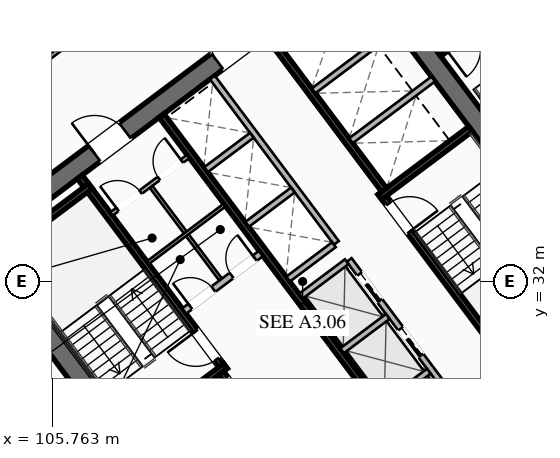
"""IFC4 building model, lengths in metres.
Left out: names, types, materials, properties, quantities, classifications, styles, units other than length and angle.
Written with IfcOpenShell. Run it as: python <this file> out.ifc"""

import sys

from ifc_helpers import new_model, si_unit, direction, frame, frame_2d, origin, place, context, subcontext, project, spatial, rectangle, extrude, element, fill, save


model = new_model("IFC4")
c1 = context("Model", 3, precision=1e-05, world=origin(), true_north=direction((0.0, 1.0)))
c2 = subcontext(c1, "Body", "Model", "MODEL_VIEW")
j1 = project(units=[si_unit("LENGTHUNIT", "METRE"), si_unit("PLANEANGLEUNIT", "RADIAN")], contexts=[c1])
p1 = place(None, origin())
s1 = spatial("IfcSite", under=j1, at=p1, CompositionType="ELEMENT")
p2 = place(p1, origin())
s2 = spatial("IfcBuilding", under=s1, at=p2, CompositionType="ELEMENT")
p3 = place(p2, frame((0.0, 0.0, 74.3)))
s3 = spatial("IfcBuildingStorey", under=s2, at=p3, CompositionType="ELEMENT", Elevation=74.3)
for number, where, z_axis, x_axis in (
    (1, (112.476, 21.107, 0.0), (0.0, 0.0, 1.0), (-0.6, 0.8, 0.0)),
    (2, (115.524, 42.893, 0.0), (0.0, 0.0, 1.0), (0.6, -0.8, 0.0)),
):
    element("IfcWall", number, at=place(p3, frame(where, z_axis=z_axis, x_axis=x_axis)), inside=s3, PredefinedType="SHEAR", context=c2, shape_type="SweptSolid", body=[
        extrude(rectangle(XDim=15.6, YDim=0.65, at=frame_2d((7.8, 0.0))), origin(), (0.0, 0.0, 1.0), 3.55),
    ])
p4 = place(p3, frame((124.429, 30.478, 0.0), z_axis=(0.0, 0.0, 1.0), x_axis=(-0.799998028465, -0.600002628705, 0.0)))
e3 = element("IfcWall", 3, at=p4, inside=s3, PredefinedType="SHEAR", context=c2, shape_type="SweptSolid", body=[
    extrude(rectangle(XDim=14.86, YDim=0.65, at=frame_2d((7.43, 0.0))), origin(), (0.0, 0.0, 1.0), 3.55),
])
p5 = place(p4, frame((9.13, 0.0, 0.0)))
e4 = element("IfcOpeningElement", 4, at=p5, cuts=e3, PredefinedType="OPENING", context=c2, shape_type="SweptSolid", body=[
    extrude(rectangle(XDim=1.25, YDim=2.25, at=frame_2d((0.625, 1.125))), frame((0.0, 0.335, 0.0), z_axis=(0.0, -1.0, 0.0), x_axis=(1.0, 0.0, 0.0)), (0.0, 0.0, 1.0), 0.67),
])
p6 = place(p4, frame((4.08, 0.0, 0.0)))
e5 = element("IfcOpeningElement", 5, at=p6, cuts=e3, PredefinedType="OPENING", context=c2, shape_type="SweptSolid", body=[
    extrude(rectangle(XDim=1.25, YDim=2.25, at=frame_2d((0.625, 1.125))), frame((0.0, 0.335, 0.0), z_axis=(0.0, -1.0, 0.0), x_axis=(1.0, 0.0, 0.0)), (0.0, 0.0, 1.0), 0.67),
])
p7 = place(p3, frame((103.571, 33.522, 0.0), z_axis=(0.0, 0.0, 1.0), x_axis=(0.799998028465, 0.600002628705, 0.0)))
e6 = element("IfcWall", 6, at=p7, inside=s3, PredefinedType="SHEAR", context=c2, shape_type="SweptSolid", body=[
    extrude(rectangle(XDim=14.86, YDim=0.65, at=frame_2d((7.43, 0.0))), origin(), (0.0, 0.0, 1.0), 3.55),
])
p8 = place(p7, frame((4.48, 0.0, 0.0)))
e7 = element("IfcOpeningElement", 7, at=p8, cuts=e6, PredefinedType="OPENING", context=c2, shape_type="SweptSolid", body=[
    extrude(rectangle(XDim=1.25, YDim=2.25, at=frame_2d((0.625, 1.125))), frame((0.0, 0.335, 0.0), z_axis=(0.0, -1.0, 0.0), x_axis=(1.0, 0.0, 0.0)), (0.0, 0.0, 1.0), 0.67),
])
p9 = place(p7, frame((9.53, 0.0, 0.0)))
e8 = element("IfcOpeningElement", 8, at=p9, cuts=e6, PredefinedType="OPENING", context=c2, shape_type="SweptSolid", body=[
    extrude(rectangle(XDim=1.25, YDim=2.25, at=frame_2d((0.625, 1.125))), frame((0.0, 0.335, 0.0), z_axis=(0.0, -1.0, 0.0), x_axis=(1.0, 0.0, 0.0)), (0.0, 0.0, 1.0), 0.67),
])
p10 = place(p3, frame((111.44, 29.08, 0.0), z_axis=(0.0, 0.0, 1.0), x_axis=(-0.600009827119, 0.799992629566, 0.0)))
e9 = element("IfcWall", 9, at=p10, inside=s3, PredefinedType="SHEAR", context=c2, shape_type="SweptSolid", body=[
    extrude(rectangle(XDim=7.95, YDim=0.2, at=frame_2d((3.975, 0.0))), origin(), (0.0, 0.0, 1.0), 3.35),
])
p11 = place(p10, frame((0.45, 0.0, 0.0)))
e10 = element("IfcOpeningElement", 10, at=p11, cuts=e9, PredefinedType="OPENING", context=c2, shape_type="SweptSolid", body=[
    extrude(rectangle(XDim=1.15, YDim=2.2, at=frame_2d((0.575, 1.1))), frame((0.0, 0.11, 0.0), z_axis=(0.0, -1.0, 0.0), x_axis=(1.0, 0.0, 0.0)), (0.0, 0.0, 1.0), 0.22),
])
for number, where, z_axis, x_axis in (
    (11, (108.476, 26.982, 0.0), (0.0, 0.0, 1.0), (0.8, 0.6, 0.0)),
    (12, (104.036, 32.902, 0.0), (0.0, 0.0, 1.0), (0.8, 0.6, 0.0)),
):
    element("IfcWall", number, at=place(p3, frame(where, z_axis=z_axis, x_axis=x_axis)), inside=s3, PredefinedType="SHEAR", context=c2, shape_type="SweptSolid", body=[
        extrude(rectangle(XDim=3.73, YDim=0.2, at=frame_2d((1.865, 0.0))), origin(), (0.0, 0.0, 1.0), 3.35),
    ])
p12 = place(p3, frame((116.56, 34.92, 0.0), z_axis=(0.0, 0.0, 1.0), x_axis=(0.600009827119, -0.799992629566, 0.0)))
e13 = element("IfcWall", 13, at=p12, inside=s3, PredefinedType="SHEAR", context=c2, shape_type="SweptSolid", body=[
    extrude(rectangle(XDim=7.95, YDim=0.2, at=frame_2d((3.975, 0.0))), origin(), (0.0, 0.0, 1.0), 3.35),
])
p13 = place(p12, frame((0.45, 0.0, 0.0)))
e14 = element("IfcOpeningElement", 14, at=p13, cuts=e13, PredefinedType="OPENING", context=c2, shape_type="SweptSolid", body=[
    extrude(rectangle(XDim=1.15, YDim=2.2, at=frame_2d((0.575, 1.1))), frame((0.0, 0.11, 0.0), z_axis=(0.0, -1.0, 0.0), x_axis=(1.0, 0.0, 0.0)), (0.0, 0.0, 1.0), 0.22),
])
p14 = place(p3, frame((116.54, 34.78, 0.0), z_axis=(0.0, 0.0, 1.0), x_axis=(0.799984290658, 0.600020945218, 0.0)))
e15 = element("IfcWall", 15, at=p14, inside=s3, PredefinedType="SHEAR", context=c2, shape_type="SweptSolid", body=[
    extrude(rectangle(XDim=3.73, YDim=0.2, at=frame_2d((1.865, 0.0))), origin(), (0.0, 0.0, 1.0), 3.35),
])
p15 = place(p3, frame((117.938, 26.016, 0.0), z_axis=(0.0, 0.0, 1.0), x_axis=(-0.600005463273, 0.799995902516, 0.0)))
e16 = element("IfcWall", 16, at=p15, inside=s3, PredefinedType="SHEAR", context=c2, shape_type="SweptSolid", body=[
    extrude(rectangle(XDim=14.3, YDim=0.2, at=frame_2d((7.15, 0.0))), origin(), (0.0, 0.0, 1.0), 3.35),
])
p16 = place(p3, frame((110.104, 31.028, 0.0), z_axis=(0.0, 0.0, 1.0), x_axis=(0.800018601094, 0.59997519774, 0.0)))
e17 = element("IfcWall", 17, at=p16, inside=s3, PredefinedType="SOLIDWALL", context=c2, shape_type="SweptSolid", body=[
    extrude(rectangle(XDim=3.15, YDim=0.22, at=frame_2d((1.575, 0.0))), origin(), (0.0, 0.0, 1.0), 2.703),
])
p17 = place(p16, frame((0.25, 0.0, 0.0)))
e18 = element("IfcOpeningElement", 18, at=p17, cuts=e17, PredefinedType="OPENING", context=c2, shape_type="SweptSolid", body=[
    extrude(rectangle(XDim=0.95, YDim=2.05, at=frame_2d((0.475, 1.025))), frame((0.0, 0.12, 0.0), z_axis=(0.0, -1.0, 0.0), x_axis=(1.0, 0.0, 0.0)), (0.0, 0.0, 1.0), 0.24),
])
p18 = place(p16, frame((1.95, 0.0, 0.0)))
e19 = element("IfcOpeningElement", 19, at=p18, cuts=e17, PredefinedType="OPENING", context=c2, shape_type="SweptSolid", body=[
    extrude(rectangle(XDim=0.95, YDim=2.05, at=frame_2d((0.475, 1.025))), frame((0.0, 0.12, 0.0), z_axis=(0.0, -1.0, 0.0), x_axis=(1.0, 0.0, 0.0)), (0.0, 0.0, 1.0), 0.24),
])
p19 = place(p3, frame((115.13, 23.91, 0.0), z_axis=(0.0, 0.0, 1.0), x_axis=(-0.599975393228, 0.800018454488, 0.0)))
e20 = element("IfcWall", 20, at=p19, inside=s3, PredefinedType="SHEAR", context=c2, shape_type="SweptSolid", body=[
    extrude(rectangle(XDim=6.35, YDim=0.2, at=frame_2d((3.175, 0.0))), origin(), (0.0, 0.0, 1.0), 3.35),
])
p20 = place(p19, frame((4.775, 0.0, 0.0)))
e21 = element("IfcOpeningElement", 21, at=p20, cuts=e20, PredefinedType="OPENING", context=c2, shape_type="SweptSolid", body=[
    extrude(rectangle(XDim=1.3, YDim=2.25, at=frame_2d((0.65, 1.125))), frame((0.0, 0.11, 0.0), z_axis=(0.0, -1.0, 0.0), x_axis=(1.0, 0.0, 0.0)), (0.0, 0.0, 1.0), 0.22),
])
p21 = place(p19, frame((2.775, 0.0, 0.0)))
e22 = element("IfcOpeningElement", 22, at=p21, cuts=e20, PredefinedType="OPENING", context=c2, shape_type="SweptSolid", body=[
    extrude(rectangle(XDim=1.3, YDim=2.25, at=frame_2d((0.65, 1.125))), frame((0.0, 0.11, 0.0), z_axis=(0.0, -1.0, 0.0), x_axis=(1.0, 0.0, 0.0)), (0.0, 0.0, 1.0), 0.22),
])
p22 = place(p19, frame((0.575, 0.0, 0.0)))
e23 = element("IfcOpeningElement", 23, at=p22, cuts=e20, PredefinedType="OPENING", context=c2, shape_type="SweptSolid", body=[
    extrude(rectangle(XDim=1.3, YDim=2.25, at=frame_2d((0.65, 1.125))), frame((0.0, 0.11, 0.0), z_axis=(0.0, -1.0, 0.0), x_axis=(1.0, 0.0, 0.0)), (0.0, 0.0, 1.0), 0.22),
])
p23 = place(p3, frame((112.87, 40.09, 0.0), z_axis=(0.0, 0.0, 1.0), x_axis=(0.599975393228, -0.800018454488, 0.0)))
e24 = element("IfcWall", 24, at=p23, inside=s3, PredefinedType="SHEAR", context=c2, shape_type="SweptSolid", body=[
    extrude(rectangle(XDim=6.35, YDim=0.2, at=frame_2d((3.175, 0.0))), origin(), (0.0, 0.0, 1.0), 3.35),
])
for number, where, z_axis, x_axis in (
    (25, (115.59, 36.63, 0.0), (0.0, 0.0, 1.0), (0.8, 0.6, 0.0)),
    (26, (114.36, 38.27, 0.0), (0.0, 0.0, 1.0), (0.8, 0.6, 0.0)),
):
    element("IfcWall", number, at=place(p3, frame(where, z_axis=z_axis, x_axis=x_axis)), inside=s3, PredefinedType="SOLIDWALL", context=c2, shape_type="SweptSolid", body=[
        extrude(rectangle(XDim=3.38, YDim=0.2, at=frame_2d((1.69, 0.0))), origin(), (0.0, 0.0, 1.0), 3.35),
    ])
p24 = place(p3, frame((107.71, 34.22, 0.0), z_axis=(0.0, 0.0, 1.0), x_axis=(0.799981399002, 0.60002480053, 0.0)))
e27 = element("IfcWall", 27, at=p24, inside=s3, PredefinedType="PARTITIONING", context=c2, shape_type="SweptSolid", body=[
    extrude(rectangle(XDim=3.15, YDim=0.135, at=frame_2d((1.575, 0.0))), origin(), (0.0, 0.0, 1.0), 2.703),
])
p25 = place(p24, frame((0.25, 0.0, 0.0)))
e28 = element("IfcOpeningElement", 28, at=p25, cuts=e27, PredefinedType="OPENING", context=c2, shape_type="SweptSolid", body=[
    extrude(rectangle(XDim=0.95, YDim=2.05, at=frame_2d((0.475, 1.025))), frame((0.0, 0.077, 0.0), z_axis=(0.0, -1.0, 0.0), x_axis=(1.0, 0.0, 0.0)), (0.0, 0.0, 1.0), 0.155),
])
p26 = place(p24, frame((1.95, 0.0, 0.0)))
e29 = element("IfcOpeningElement", 29, at=p26, cuts=e27, PredefinedType="OPENING", context=c2, shape_type="SweptSolid", body=[
    extrude(rectangle(XDim=0.95, YDim=2.05, at=frame_2d((0.475, 1.025))), frame((0.0, 0.077, 0.0), z_axis=(0.0, -1.0, 0.0), x_axis=(1.0, 0.0, 0.0)), (0.0, 0.0, 1.0), 0.155),
])
p27 = place(p3, frame((111.296, 32.072, 0.0), z_axis=(0.0, 0.0, 1.0), x_axis=(-0.59995887973, 0.800030838552, 0.0)))
e30 = element("IfcWall", 30, at=p27, inside=s3, PredefinedType="PARTITIONING", context=c2, shape_type="SweptSolid", body=[
    extrude(rectangle(XDim=3.8, YDim=0.11, at=frame_2d((1.9, 0.0))), origin(), (0.0, 0.0, 1.0), 2.703),
])
p28 = place(p3, frame((108.91, 32.62, 0.0), z_axis=(0.0, 0.0, 1.0), x_axis=(0.800018601094, 0.59997519774, 0.0)))
e31 = element("IfcWall", 31, at=p28, inside=s3, PredefinedType="PARTITIONING", context=c2, shape_type="SweptSolid", body=[
    extrude(rectangle(XDim=3.15, YDim=0.11, at=frame_2d((1.575, 0.0))), origin(), (0.0, 0.0, 1.0), 2.703),
])
p29 = place(p3, frame((119.61, 27.27, 0.0), z_axis=(0.0, 0.0, 1.0), x_axis=(-0.600011488909, 0.79999138319, 0.0)))
e32 = element("IfcWall", 32, at=p29, inside=s3, PredefinedType="SOLIDWALL", context=c2, shape_type="SweptSolid", body=[
    extrude(rectangle(XDim=6.8, YDim=0.2, at=frame_2d((3.4, 0.0))), origin(), (0.0, 0.0, 1.0), 3.35),
])
p30 = place(p29, frame((0.625, 0.0, 0.0)))
e33 = element("IfcOpeningElement", 33, at=p30, cuts=e32, PredefinedType="OPENING", context=c2, shape_type="SweptSolid", body=[
    extrude(rectangle(XDim=1.1, YDim=2.2, at=frame_2d((0.55, 1.1))), frame((0.0, 0.11, 0.0), z_axis=(0.0, -1.0, 0.0), x_axis=(1.0, 0.0, 0.0)), (0.0, 0.0, 1.0), 0.22),
])
p31 = place(p29, frame((2.875, 0.0, 0.0)))
e34 = element("IfcOpeningElement", 34, at=p31, cuts=e32, PredefinedType="OPENING", context=c2, shape_type="SweptSolid", body=[
    extrude(rectangle(XDim=1.1, YDim=2.2, at=frame_2d((0.55, 1.1))), frame((0.0, 0.11, 0.0), z_axis=(0.0, -1.0, 0.0), x_axis=(1.0, 0.0, 0.0)), (0.0, 0.0, 1.0), 0.22),
])
p32 = place(p29, frame((5.125, 0.0, 0.0)))
e35 = element("IfcOpeningElement", 35, at=p32, cuts=e32, PredefinedType="OPENING", context=c2, shape_type="SweptSolid", body=[
    extrude(rectangle(XDim=1.1, YDim=2.2, at=frame_2d((0.55, 1.1))), frame((0.0, 0.11, 0.0), z_axis=(0.0, -1.0, 0.0), x_axis=(1.0, 0.0, 0.0)), (0.0, 0.0, 1.0), 0.22),
])
p33 = place(p3, frame((116.646, 27.922, 0.0), z_axis=(0.0, 0.0, 1.0), x_axis=(0.8, 0.6, 0.0)))
e36 = element("IfcWall", 36, at=p33, inside=s3, PredefinedType="SOLIDWALL", context=c2, shape_type="SweptSolid", body=[
    extrude(rectangle(XDim=1.88, YDim=0.2, at=frame_2d((0.94, 0.0))), origin(), (0.0, 0.0, 1.0), 3.35),
])
p34 = place(p3, frame((115.296, 29.722, 0.0), z_axis=(0.0, 0.0, 1.0), x_axis=(0.799984418148, 0.600020775241, 0.0)))
e37 = element("IfcWall", 37, at=p34, inside=s3, PredefinedType="SOLIDWALL", context=c2, shape_type="SweptSolid", body=[
    extrude(rectangle(XDim=1.88, YDim=0.2, at=frame_2d((0.94, 0.0))), origin(), (0.0, 0.0, 1.0), 3.35),
])
p35 = place(p3, frame((113.946, 31.522, 0.0), z_axis=(0.0, 0.0, 1.0), x_axis=(0.8, 0.6, 0.0)))
e38 = element("IfcWall", 38, at=p35, inside=s3, PredefinedType="SOLIDWALL", context=c2, shape_type="SweptSolid", body=[
    extrude(rectangle(XDim=1.88, YDim=0.2, at=frame_2d((0.94, 0.0))), origin(), (0.0, 0.0, 1.0), 3.35),
])
p36 = place(p3, frame((115.11, 33.27, 0.0), z_axis=(0.0, 0.0, 1.0), x_axis=(-0.600011488909, 0.79999138319, 0.0)))
e39 = element("IfcWall", 39, at=p36, inside=s3, PredefinedType="SOLIDWALL", context=c2, shape_type="SweptSolid", body=[
    extrude(rectangle(XDim=6.8, YDim=0.2, at=frame_2d((3.4, 0.0))), origin(), (0.0, 0.0, 1.0), 3.35),
])
p37 = place(p3, frame((113.526, 32.082, 0.0), z_axis=(0.0, 0.0, 1.0), x_axis=(0.800046745961, 0.599937666993, 0.0)))
e40 = element("IfcWall", 40, at=p37, inside=s3, PredefinedType="SOLIDWALL", context=c2, shape_type="SweptSolid", body=[
    extrude(rectangle(XDim=1.88, YDim=0.2, at=frame_2d((0.94, 0.0))), origin(), (0.0, 0.0, 1.0), 3.35),
])
p38 = place(p3, frame((112.176, 33.882, 0.0), z_axis=(0.0, 0.0, 1.0), x_axis=(0.8, 0.6, 0.0)))
e41 = element("IfcWall", 41, at=p38, inside=s3, PredefinedType="SOLIDWALL", context=c2, shape_type="SweptSolid", body=[
    extrude(rectangle(XDim=1.88, YDim=0.2, at=frame_2d((0.94, 0.0))), origin(), (0.0, 0.0, 1.0), 3.35),
])
p39 = place(p3, frame((110.826, 35.682, 0.0), z_axis=(0.0, 0.0, 1.0), x_axis=(0.799984418148, 0.600020775241, 0.0)))
e42 = element("IfcWall", 42, at=p39, inside=s3, PredefinedType="SOLIDWALL", context=c2, shape_type="SweptSolid", body=[
    extrude(rectangle(XDim=1.88, YDim=0.2, at=frame_2d((0.94, 0.0))), origin(), (0.0, 0.0, 1.0), 3.35),
])
p40 = place(p3, frame((121.204, 41.528, 0.0), z_axis=(0.0, 0.0, 1.0), x_axis=(-0.800017232136, -0.599977023131, 0.0)))
e43 = element("IfcWall", 43, at=p40, inside=s3, PredefinedType="SHEAR", context=c2, shape_type="SweptSolid", body=[
    extrude(rectangle(XDim=3.4, YDim=0.2, at=frame_2d((1.7, 0.0))), origin(), (0.0, 0.0, 1.0), 3.35),
])
p41 = place(p40, frame((1.975, 0.0, 0.0)))
e44 = element("IfcOpeningElement", 44, at=p41, cuts=e43, PredefinedType="OPENING", context=c2, shape_type="SweptSolid", body=[
    extrude(rectangle(XDim=1.15, YDim=2.2, at=frame_2d((0.575, 1.1))), frame((0.0, 0.11, 0.0), z_axis=(0.0, -1.0, 0.0), x_axis=(1.0, 0.0, 0.0)), (0.0, 0.0, 1.0), 0.22),
])
p42 = place(p3, frame((98.516, 34.012, 0.0), z_axis=(0.0, 0.0, 1.0), x_axis=(0.8, 0.6, 0.0)))
e45 = element("IfcWall", 45, at=p42, inside=s3, PredefinedType="PARTITIONING", context=c2, shape_type="SweptSolid", body=[
    extrude(rectangle(XDim=28.23, YDim=0.135, at=frame_2d((14.115, 0.0))), origin(), (0.0, 0.0, 1.0), 2.703),
])
p43 = place(p42, frame((0.3, 0.0, 0.0)))
e46 = element("IfcOpeningElement", 46, at=p43, cuts=e45, PredefinedType="OPENING", context=c2, shape_type="SweptSolid", body=[
    extrude(rectangle(XDim=0.95, YDim=2.05, at=frame_2d((0.475, 1.025))), frame((0.0, 0.077, 0.0), z_axis=(0.0, -1.0, 0.0), x_axis=(1.0, 0.0, 0.0)), (0.0, 0.0, 1.0), 0.155),
])
p44 = place(p42, frame((6.84, 0.0, 0.0)))
e47 = element("IfcOpeningElement", 47, at=p44, cuts=e45, PredefinedType="OPENING", context=c2, shape_type="SweptSolid", body=[
    extrude(rectangle(XDim=0.95, YDim=2.05, at=frame_2d((0.475, 1.025))), frame((0.0, 0.077, 0.0), z_axis=(0.0, -1.0, 0.0), x_axis=(1.0, 0.0, 0.0)), (0.0, 0.0, 1.0), 0.155),
])
p45 = place(p42, frame((10.863, 0.0, 0.0)))
e48 = element("IfcOpeningElement", 48, at=p45, cuts=e45, PredefinedType="OPENING", context=c2, shape_type="SweptSolid", body=[
    extrude(rectangle(XDim=0.95, YDim=2.05, at=frame_2d((0.475, 1.025))), frame((0.0, 0.077, 0.0), z_axis=(0.0, -1.0, 0.0), x_axis=(1.0, 0.0, 0.0)), (0.0, 0.0, 1.0), 0.155),
])
p46 = place(p42, frame((26.98, 0.0, 0.0)))
e49 = element("IfcOpeningElement", 49, at=p46, cuts=e45, PredefinedType="OPENING", context=c2, shape_type="SweptSolid", body=[
    extrude(rectangle(XDim=0.95, YDim=2.05, at=frame_2d((0.475, 1.025))), frame((0.0, 0.077, 0.0), z_axis=(0.0, -1.0, 0.0), x_axis=(1.0, 0.0, 0.0)), (0.0, 0.0, 1.0), 0.155),
])
p47 = place(p3, frame((134.18, 33.51, 0.0), z_axis=(0.0, 0.0, 1.0), x_axis=(-0.8, -0.6, 0.0)))
e50 = element("IfcWall", 50, at=p47, inside=s3, PredefinedType="PARTITIONING", context=c2, shape_type="SweptSolid", body=[
    extrude(rectangle(XDim=28.23, YDim=0.135, at=frame_2d((14.115, 0.0))), origin(), (0.0, 0.0, 1.0), 2.703),
])
p48 = place(p47, frame((26.9, 0.0, 0.0)))
e51 = element("IfcOpeningElement", 51, at=p48, cuts=e50, PredefinedType="OPENING", context=c2, shape_type="SweptSolid", body=[
    extrude(rectangle(XDim=0.95, YDim=2.05, at=frame_2d((0.475, 1.025))), frame((0.0, 0.077, 0.0), z_axis=(0.0, -1.0, 0.0), x_axis=(1.0, 0.0, 0.0)), (0.0, 0.0, 1.0), 0.155),
])
p49 = place(p47, frame((20.399, 0.0, 0.0)))
e52 = element("IfcOpeningElement", 52, at=p49, cuts=e50, PredefinedType="OPENING", context=c2, shape_type="SweptSolid", body=[
    extrude(rectangle(XDim=0.95, YDim=2.05, at=frame_2d((0.475, 1.025))), frame((0.0, 0.077, 0.0), z_axis=(0.0, -1.0, 0.0), x_axis=(1.0, 0.0, 0.0)), (0.0, 0.0, 1.0), 0.155),
])
p50 = place(p47, frame((16.339, 0.0, 0.0)))
e53 = element("IfcOpeningElement", 53, at=p50, cuts=e50, PredefinedType="OPENING", context=c2, shape_type="SweptSolid", body=[
    extrude(rectangle(XDim=0.95, YDim=2.05, at=frame_2d((0.475, 1.025))), frame((0.0, 0.077, 0.0), z_axis=(0.0, -1.0, 0.0), x_axis=(1.0, 0.0, 0.0)), (0.0, 0.0, 1.0), 0.155),
])
p51 = place(p47, frame((0.38, 0.0, 0.0)))
e54 = element("IfcOpeningElement", 54, at=p51, cuts=e50, PredefinedType="OPENING", context=c2, shape_type="SweptSolid", body=[
    extrude(rectangle(XDim=0.95, YDim=2.05, at=frame_2d((0.475, 1.025))), frame((0.0, 0.077, 0.0), z_axis=(0.0, -1.0, 0.0), x_axis=(1.0, 0.0, 0.0)), (0.0, 0.0, 1.0), 0.155),
])
p52 = place(p3, frame((111.548, 16.636, 0.0), z_axis=(0.0, 0.0, 1.0), x_axis=(-0.600003610192, 0.799997292343, 0.0)))
e55 = element("IfcWall", 55, at=p52, inside=s3, PredefinedType="PARTITIONING", context=c2, shape_type="SweptSolid", body=[
    extrude(rectangle(XDim=21.64, YDim=0.135, at=frame_2d((10.82, 0.0))), origin(), (0.0, 0.0, 1.0), 2.703),
])
p53 = place(p52, frame((0.3, 0.0, 0.0)))
e56 = element("IfcOpeningElement", 56, at=p53, cuts=e55, PredefinedType="OPENING", context=c2, shape_type="SweptSolid", body=[
    extrude(rectangle(XDim=0.95, YDim=2.05, at=frame_2d((0.475, 1.025))), frame((0.0, 0.077, 0.0), z_axis=(0.0, -1.0, 0.0), x_axis=(1.0, 0.0, 0.0)), (0.0, 0.0, 1.0), 0.155),
])
p54 = place(p8, origin())
e57 = element("IfcDoor", 57, at=p54, inside=s3, OperationType="SINGLE_SWING_LEFT", PredefinedType="DOOR", context=c2, shape_type="SweptSolid", body=[
    extrude(rectangle(XDim=1.25, YDim=2.25, at=frame_2d((0.625, 1.125))), frame((0.0, 0.025, 0.0), z_axis=(0.0, -1.0, 0.0), x_axis=(1.0, 0.0, 0.0)), (0.0, 0.0, 1.0), 0.05),
])
fill(e7, e57)
p55 = place(p9, origin())
e58 = element("IfcDoor", 58, at=p55, inside=s3, OperationType="SINGLE_SWING_RIGHT", PredefinedType="DOOR", context=c2, shape_type="SweptSolid", body=[
    extrude(rectangle(XDim=1.25, YDim=2.25, at=frame_2d((0.625, 1.125))), frame((0.0, 0.025, 0.0), z_axis=(0.0, -1.0, 0.0), x_axis=(1.0, 0.0, 0.0)), (0.0, 0.0, 1.0), 0.05),
])
fill(e8, e58)
p56 = place(p11, origin())
e59 = element("IfcDoor", 59, at=p56, inside=s3, OperationType="SINGLE_SWING_RIGHT", PredefinedType="DOOR", context=c2, shape_type="SweptSolid", body=[
    extrude(rectangle(XDim=1.15, YDim=2.2, at=frame_2d((0.575, 1.1))), frame((0.0, 0.025, 0.0), z_axis=(0.0, -1.0, 0.0), x_axis=(1.0, 0.0, 0.0)), (0.0, 0.0, 1.0), 0.05),
])
fill(e10, e59)
p57 = place(p13, origin())
e60 = element("IfcDoor", 60, at=p57, inside=s3, OperationType="SINGLE_SWING_RIGHT", PredefinedType="DOOR", context=c2, shape_type="SweptSolid", body=[
    extrude(rectangle(XDim=1.15, YDim=2.2, at=frame_2d((0.575, 1.1))), frame((0.0, 0.025, 0.0), z_axis=(0.0, -1.0, 0.0), x_axis=(1.0, 0.0, 0.0)), (0.0, 0.0, 1.0), 0.05),
])
fill(e14, e60)
p58 = place(p25, origin())
e61 = element("IfcDoor", 61, at=p58, inside=s3, OperationType="SINGLE_SWING_LEFT", PredefinedType="DOOR", context=c2, shape_type="SweptSolid", body=[
    extrude(rectangle(XDim=0.95, YDim=2.05, at=frame_2d((0.475, 1.025))), frame((0.0, 0.025, 0.0), z_axis=(0.0, -1.0, 0.0), x_axis=(1.0, 0.0, 0.0)), (0.0, 0.0, 1.0), 0.05),
])
fill(e28, e61)
p59 = place(p26, origin())
e62 = element("IfcDoor", 62, at=p59, inside=s3, OperationType="SINGLE_SWING_RIGHT", PredefinedType="DOOR", context=c2, shape_type="SweptSolid", body=[
    extrude(rectangle(XDim=0.95, YDim=2.05, at=frame_2d((0.475, 1.025))), frame((0.0, 0.025, 0.0), z_axis=(0.0, -1.0, 0.0), x_axis=(1.0, 0.0, 0.0)), (0.0, 0.0, 1.0), 0.05),
])
fill(e29, e62)
p60 = place(p17, origin())
e63 = element("IfcDoor", 63, at=p60, inside=s3, OperationType="SINGLE_SWING_LEFT", PredefinedType="DOOR", context=c2, shape_type="SweptSolid", body=[
    extrude(rectangle(XDim=0.95, YDim=2.05, at=frame_2d((0.475, 1.025))), frame((0.0, 0.025, 0.0), z_axis=(0.0, -1.0, 0.0), x_axis=(1.0, 0.0, 0.0)), (0.0, 0.0, 1.0), 0.05),
])
fill(e18, e63)
p61 = place(p18, origin())
e64 = element("IfcDoor", 64, at=p61, inside=s3, OperationType="SINGLE_SWING_RIGHT", PredefinedType="DOOR", context=c2, shape_type="SweptSolid", body=[
    extrude(rectangle(XDim=0.95, YDim=2.05, at=frame_2d((0.475, 1.025))), frame((0.0, 0.025, 0.0), z_axis=(0.0, -1.0, 0.0), x_axis=(1.0, 0.0, 0.0)), (0.0, 0.0, 1.0), 0.05),
])
fill(e19, e64)
p62 = place(p31, origin())
e65 = element("IfcDoor", 65, at=p62, inside=s3, OperationType="SLIDING_TO_LEFT", PredefinedType="DOOR", context=c2, shape_type="SweptSolid", body=[
    extrude(rectangle(XDim=1.1, YDim=2.2, at=frame_2d((0.55, 1.1))), frame((0.0, 0.025, 0.0), z_axis=(0.0, -1.0, 0.0), x_axis=(1.0, 0.0, 0.0)), (0.0, 0.0, 1.0), 0.05),
])
fill(e34, e65)
p63 = place(p32, origin())
e66 = element("IfcDoor", 66, at=p63, inside=s3, OperationType="SLIDING_TO_LEFT", PredefinedType="DOOR", context=c2, shape_type="SweptSolid", body=[
    extrude(rectangle(XDim=1.1, YDim=2.2, at=frame_2d((0.55, 1.1))), frame((0.0, 0.025, 0.0), z_axis=(0.0, -1.0, 0.0), x_axis=(1.0, 0.0, 0.0)), (0.0, 0.0, 1.0), 0.05),
])
fill(e35, e66)
save(model, sys.argv[1])
